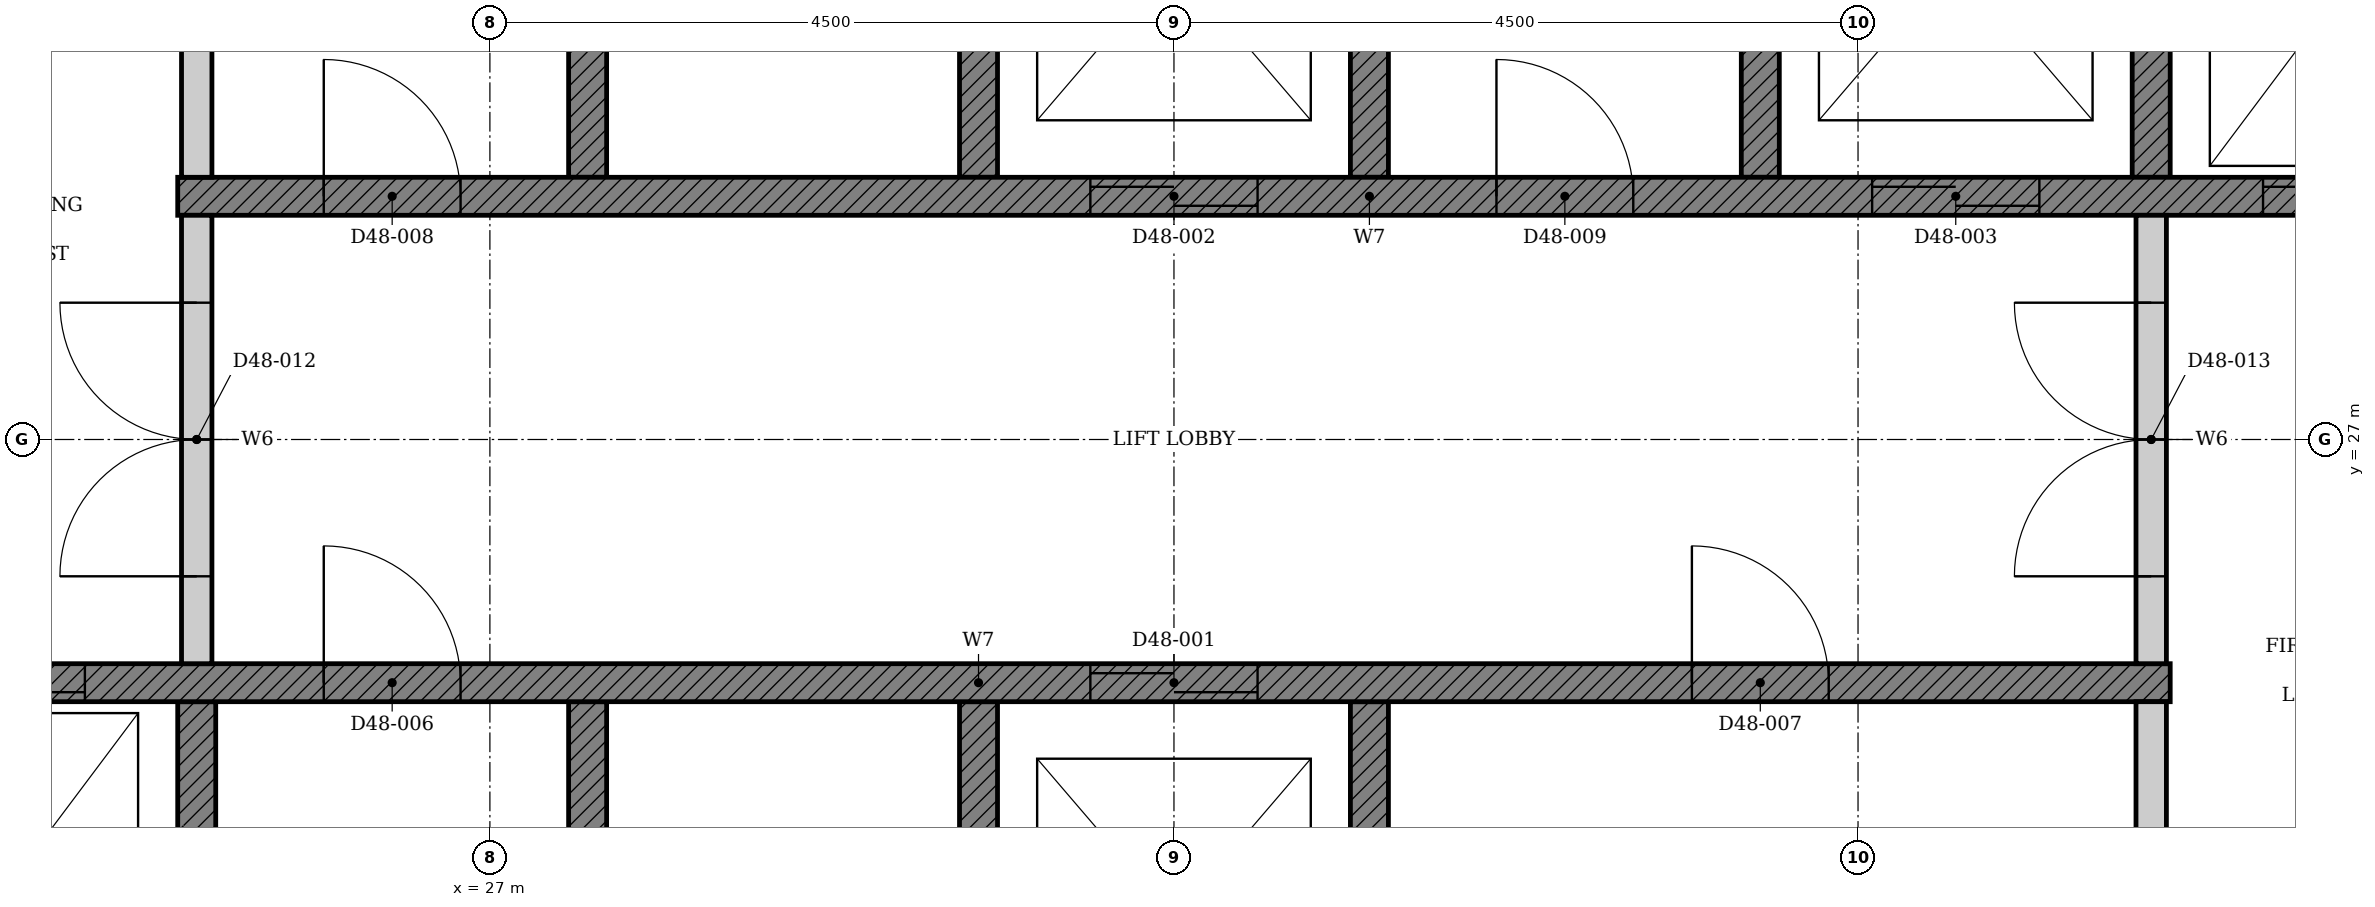
"""IFC4 building model, lengths in metres.
Left out: names, types, materials, properties, quantities, classifications, styles, units other than length and angle.
Written with IfcOpenShell. Run it as: python <this file> out.ifc"""

import sys

from ifc_helpers import new_model, si_unit, direction, frame, frame_2d, origin, place, context, subcontext, project, spatial, polyline, rectangle, outline, extrude, element, fill, save


model = new_model("IFC4")
c1 = context("Model", 3, precision=1e-05, world=origin(), true_north=direction((0.0, 1.0)))
c2 = subcontext(c1, "Body", "Model", "MODEL_VIEW")
j1 = project(units=[si_unit("LENGTHUNIT", "METRE"), si_unit("PLANEANGLEUNIT", "RADIAN")], contexts=[c1])
p1 = place(None, origin())
s1 = spatial("IfcSite", under=j1, at=p1, CompositionType="ELEMENT")
p2 = place(p1, origin())
s2 = spatial("IfcBuilding", under=s1, at=p2, CompositionType="ELEMENT")
p3 = place(p2, frame((0.0, 0.0, 192.4)))
s3 = spatial("IfcBuildingStorey", under=s2, at=p3, CompositionType="ELEMENT", Elevation=192.4)
p4 = place(p3, origin())
e1 = element("IfcWall", 1, at=p4, inside=s3, PredefinedType="SHEAR", context=c2, shape_type="SweptSolid", body=[
    extrude(outline(polyline([(22.375, 22.35), (25.197, 22.35), (25.197, 25.275), (24.947, 25.275), (24.947, 22.65), (22.625, 22.65), (22.625, 25.275), (22.375, 25.275), (22.375, 22.35)])), origin(), (0.0, 0.0, 1.0), 3.4),
])
p5 = place(p3, origin())
e2 = element("IfcWall", 2, at=p5, inside=s3, PredefinedType="SHEAR", context=c2, shape_type="SweptSolid", body=[
    extrude(outline(polyline([(27.518, 22.35), (32.911, 22.35), (32.911, 25.275), (32.661, 25.275), (32.661, 22.65), (30.339, 22.65), (30.339, 25.275), (30.089, 25.275), (30.089, 22.65), (27.768, 22.65), (27.768, 25.275), (27.518, 25.275), (27.518, 22.35)])), origin(), (0.0, 0.0, 1.0), 3.4),
])
p6 = place(p3, origin())
e3 = element("IfcWall", 3, at=p6, inside=s3, PredefinedType="SHEAR", context=c2, shape_type="SweptSolid", body=[
    extrude(outline(polyline([(27.518, 28.725), (27.768, 28.725), (27.768, 31.35), (30.089, 31.35), (30.089, 28.725), (30.339, 28.725), (30.339, 31.35), (32.661, 31.35), (32.661, 28.725), (32.911, 28.725), (32.911, 31.65), (27.518, 31.65), (27.518, 28.725)])), origin(), (0.0, 0.0, 1.0), 3.4),
])
p7 = place(p3, origin())
e4 = element("IfcWall", 4, at=p7, inside=s3, PredefinedType="SHEAR", context=c2, shape_type="SweptSolid", body=[
    extrude(outline(polyline([(35.232, 28.725), (35.482, 28.725), (35.482, 31.35), (37.803, 31.35), (37.803, 28.725), (38.053, 28.725), (38.053, 31.35), (40.375, 31.35), (40.375, 28.725), (40.625, 28.725), (40.625, 31.65), (35.232, 31.65), (35.232, 28.725)])), origin(), (0.0, 0.0, 1.0), 3.4),
])
p8 = place(p3, frame((22.375, 25.4, 0.0), z_axis=(0.0, 0.0, 1.0), x_axis=(1.0, 0.0, 0.0)))
e5 = element("IfcWall", 5, at=p8, inside=s3, PredefinedType="SHEAR", context=c2, shape_type="SweptSolid", body=[
    extrude(rectangle(XDim=15.678, YDim=0.25, at=frame_2d((7.839, 0.0))), origin(), (0.0, 0.0, 1.0), 3.4),
])
p9 = place(p8, frame((8.575, 0.0, 0.0)))
e6 = element("IfcOpeningElement", 6, at=p9, cuts=e5, PredefinedType="OPENING", context=c2, shape_type="SweptSolid", body=[
    extrude(rectangle(XDim=1.1, YDim=2.1, at=frame_2d((0.55, 1.05))), frame((0.0, 0.135, 0.0), z_axis=(0.0, -1.0, 0.0), x_axis=(1.0, 0.0, 0.0)), (0.0, 0.0, 1.0), 0.27),
])
p10 = place(p8, frame((0.861, 0.0, 0.0)))
e7 = element("IfcOpeningElement", 7, at=p10, cuts=e5, PredefinedType="OPENING", context=c2, shape_type="SweptSolid", body=[
    extrude(rectangle(XDim=1.1, YDim=2.1, at=frame_2d((0.55, 1.05))), frame((0.0, 0.135, 0.0), z_axis=(0.0, -1.0, 0.0), x_axis=(1.0, 0.0, 0.0)), (0.0, 0.0, 1.0), 0.27),
])
p11 = place(p8, frame((3.532, 0.0, 0.0)))
e8 = element("IfcOpeningElement", 8, at=p11, cuts=e5, PredefinedType="OPENING", context=c2, shape_type="SweptSolid", body=[
    extrude(rectangle(XDim=0.9, YDim=2.1, at=frame_2d((0.45, 1.05))), frame((0.0, 0.135, 0.0), z_axis=(0.0, -1.0, 0.0), x_axis=(1.0, 0.0, 0.0)), (0.0, 0.0, 1.0), 0.27),
])
p12 = place(p8, frame((12.532, 0.0, 0.0)))
e9 = element("IfcOpeningElement", 9, at=p12, cuts=e5, PredefinedType="OPENING", context=c2, shape_type="SweptSolid", body=[
    extrude(rectangle(XDim=0.9, YDim=2.1, at=frame_2d((0.45, 1.05))), frame((0.0, 0.135, 0.0), z_axis=(0.0, -1.0, 0.0), x_axis=(1.0, 0.0, 0.0)), (0.0, 0.0, 1.0), 0.27),
])
p13 = place(p3, frame((24.947, 28.6, 0.0), z_axis=(0.0, 0.0, 1.0), x_axis=(1.0, 0.0, 0.0)))
e10 = element("IfcWall", 10, at=p13, inside=s3, PredefinedType="SHEAR", context=c2, shape_type="SweptSolid", body=[
    extrude(rectangle(XDim=15.678, YDim=0.25, at=frame_2d((7.839, 0.0))), origin(), (0.0, 0.0, 1.0), 3.4),
])
p14 = place(p13, frame((6.004, 0.0, 0.0)))
e11 = element("IfcOpeningElement", 11, at=p14, cuts=e10, PredefinedType="OPENING", context=c2, shape_type="SweptSolid", body=[
    extrude(rectangle(XDim=1.1, YDim=2.1, at=frame_2d((0.55, 1.05))), frame((0.0, 0.135, 0.0), z_axis=(0.0, -1.0, 0.0), x_axis=(1.0, 0.0, 0.0)), (0.0, 0.0, 1.0), 0.27),
])
p15 = place(p13, frame((11.146, 0.0, 0.0)))
e12 = element("IfcOpeningElement", 12, at=p15, cuts=e10, PredefinedType="OPENING", context=c2, shape_type="SweptSolid", body=[
    extrude(rectangle(XDim=1.1, YDim=2.1, at=frame_2d((0.55, 1.05))), frame((0.0, 0.135, 0.0), z_axis=(0.0, -1.0, 0.0), x_axis=(1.0, 0.0, 0.0)), (0.0, 0.0, 1.0), 0.27),
])
p16 = place(p13, frame((13.718, 0.0, 0.0)))
e13 = element("IfcOpeningElement", 13, at=p16, cuts=e10, PredefinedType="OPENING", context=c2, shape_type="SweptSolid", body=[
    extrude(rectangle(XDim=1.1, YDim=2.1, at=frame_2d((0.55, 1.05))), frame((0.0, 0.135, 0.0), z_axis=(0.0, -1.0, 0.0), x_axis=(1.0, 0.0, 0.0)), (0.0, 0.0, 1.0), 0.27),
])
p17 = place(p13, frame((0.961, 0.0, 0.0)))
e14 = element("IfcOpeningElement", 14, at=p17, cuts=e10, PredefinedType="OPENING", context=c2, shape_type="SweptSolid", body=[
    extrude(rectangle(XDim=0.9, YDim=2.1, at=frame_2d((0.45, 1.05))), frame((0.0, 0.135, 0.0), z_axis=(0.0, -1.0, 0.0), x_axis=(1.0, 0.0, 0.0)), (0.0, 0.0, 1.0), 0.27),
])
p18 = place(p13, frame((8.675, 0.0, 0.0)))
e15 = element("IfcOpeningElement", 15, at=p18, cuts=e10, PredefinedType="OPENING", context=c2, shape_type="SweptSolid", body=[
    extrude(rectangle(XDim=0.9, YDim=2.1, at=frame_2d((0.45, 1.05))), frame((0.0, 0.135, 0.0), z_axis=(0.0, -1.0, 0.0), x_axis=(1.0, 0.0, 0.0)), (0.0, 0.0, 1.0), 0.27),
])
for number, where, z_axis, x_axis in (
    (16, (37.928, 22.65, 0.0), (0.0, 0.0, 1.0), (0.0, 1.0, 0.0)),
    (17, (25.072, 28.725, 0.0), (0.0, 0.0, 1.0), (0.0, 1.0, 0.0)),
):
    element("IfcWall", number, at=place(p3, frame(where, z_axis=z_axis, x_axis=x_axis)), inside=s3, PredefinedType="PARTITIONING", context=c2, shape_type="SweptSolid", body=[
        extrude(rectangle(XDim=2.625, YDim=0.2, at=frame_2d((1.312, 0.0))), origin(), (0.0, 0.0, 1.0), 3.4),
    ])
p19 = place(p3, frame((25.072, 25.525, 0.0), z_axis=(0.0, 0.0, 1.0), x_axis=(0.0, 1.0, 0.0)))
e18 = element("IfcWall", 18, at=p19, inside=s3, PredefinedType="PARTITIONING", context=c2, shape_type="SweptSolid", body=[
    extrude(rectangle(XDim=2.95, YDim=0.2, at=frame_2d((1.475, 0.0))), origin(), (0.0, 0.0, 1.0), 3.4),
])
p20 = place(p19, frame((0.575, 0.0, 0.0)))
e19 = element("IfcOpeningElement", 19, at=p20, cuts=e18, PredefinedType="OPENING", context=c2, shape_type="SweptSolid", body=[
    extrude(rectangle(XDim=1.8, YDim=2.1, at=frame_2d((0.9, 1.05))), frame((0.0, 0.11, 0.0), z_axis=(0.0, -1.0, 0.0), x_axis=(1.0, 0.0, 0.0)), (0.0, 0.0, 1.0), 0.22),
])
p21 = place(p3, frame((37.928, 25.525, 0.0), z_axis=(0.0, 0.0, 1.0), x_axis=(0.0, 1.0, 0.0)))
e20 = element("IfcWall", 20, at=p21, inside=s3, PredefinedType="PARTITIONING", context=c2, shape_type="SweptSolid", body=[
    extrude(rectangle(XDim=2.95, YDim=0.2, at=frame_2d((1.475, 0.0))), origin(), (0.0, 0.0, 1.0), 3.4),
])
p22 = place(p21, frame((0.575, 0.0, 0.0)))
e21 = element("IfcOpeningElement", 21, at=p22, cuts=e20, PredefinedType="OPENING", context=c2, shape_type="SweptSolid", body=[
    extrude(rectangle(XDim=1.8, YDim=2.1, at=frame_2d((0.9, 1.05))), frame((0.0, 0.11, 0.0), z_axis=(0.0, -1.0, 0.0), x_axis=(1.0, 0.0, 0.0)), (0.0, 0.0, 1.0), 0.22),
])
p23 = place(p9, origin())
e22 = element("IfcDoor", 22, at=p23, inside=s3, OperationType="DOUBLE_DOOR_SLIDING", PredefinedType="DOOR", context=c2, shape_type="SweptSolid", body=[
    extrude(rectangle(XDim=1.1, YDim=2.1, at=frame_2d((0.55, 1.05))), frame((0.0, 0.025, 0.0), z_axis=(0.0, -1.0, 0.0), x_axis=(1.0, 0.0, 0.0)), (0.0, 0.0, 1.0), 0.05),
])
fill(e6, e22)
p24 = place(p14, origin())
e23 = element("IfcDoor", 23, at=p24, inside=s3, OperationType="DOUBLE_DOOR_SLIDING", PredefinedType="DOOR", context=c2, shape_type="SweptSolid", body=[
    extrude(rectangle(XDim=1.1, YDim=2.1, at=frame_2d((0.55, 1.05))), frame((0.0, 0.025, 0.0), z_axis=(0.0, -1.0, 0.0), x_axis=(1.0, 0.0, 0.0)), (0.0, 0.0, 1.0), 0.05),
])
fill(e11, e23)
p25 = place(p15, origin())
e24 = element("IfcDoor", 24, at=p25, inside=s3, OperationType="DOUBLE_DOOR_SLIDING", PredefinedType="DOOR", context=c2, shape_type="SweptSolid", body=[
    extrude(rectangle(XDim=1.1, YDim=2.1, at=frame_2d((0.55, 1.05))), frame((0.0, 0.025, 0.0), z_axis=(0.0, -1.0, 0.0), x_axis=(1.0, 0.0, 0.0)), (0.0, 0.0, 1.0), 0.05),
])
fill(e12, e24)
p26 = place(p10, origin())
e25 = element("IfcDoor", 25, at=p26, inside=s3, OperationType="DOUBLE_DOOR_SLIDING", PredefinedType="DOOR", context=c2, shape_type="SweptSolid", body=[
    extrude(rectangle(XDim=1.1, YDim=2.1, at=frame_2d((0.55, 1.05))), frame((0.0, 0.025, 0.0), z_axis=(0.0, -1.0, 0.0), x_axis=(1.0, 0.0, 0.0)), (0.0, 0.0, 1.0), 0.05),
])
fill(e7, e25)
p27 = place(p16, origin())
e26 = element("IfcDoor", 26, at=p27, inside=s3, OperationType="DOUBLE_DOOR_SLIDING", PredefinedType="DOOR", context=c2, shape_type="SweptSolid", body=[
    extrude(rectangle(XDim=1.1, YDim=2.1, at=frame_2d((0.55, 1.05))), frame((0.0, 0.025, 0.0), z_axis=(0.0, -1.0, 0.0), x_axis=(1.0, 0.0, 0.0)), (0.0, 0.0, 1.0), 0.05),
])
fill(e13, e26)
p28 = place(p11, origin())
e27 = element("IfcDoor", 27, at=p28, inside=s3, OperationType="SINGLE_SWING_LEFT", PredefinedType="DOOR", context=c2, shape_type="SweptSolid", body=[
    extrude(rectangle(XDim=0.9, YDim=2.1, at=frame_2d((0.45, 1.05))), frame((0.0, 0.025, 0.0), z_axis=(0.0, -1.0, 0.0), x_axis=(1.0, 0.0, 0.0)), (0.0, 0.0, 1.0), 0.05),
])
fill(e8, e27)
p29 = place(p12, origin())
e28 = element("IfcDoor", 28, at=p29, inside=s3, OperationType="SINGLE_SWING_LEFT", PredefinedType="DOOR", context=c2, shape_type="SweptSolid", body=[
    extrude(rectangle(XDim=0.9, YDim=2.1, at=frame_2d((0.45, 1.05))), frame((0.0, 0.025, 0.0), z_axis=(0.0, -1.0, 0.0), x_axis=(1.0, 0.0, 0.0)), (0.0, 0.0, 1.0), 0.05),
])
fill(e9, e28)
p30 = place(p17, origin())
e29 = element("IfcDoor", 29, at=p30, inside=s3, OperationType="SINGLE_SWING_LEFT", PredefinedType="DOOR", context=c2, shape_type="SweptSolid", body=[
    extrude(rectangle(XDim=0.9, YDim=2.1, at=frame_2d((0.45, 1.05))), frame((0.0, 0.025, 0.0), z_axis=(0.0, -1.0, 0.0), x_axis=(1.0, 0.0, 0.0)), (0.0, 0.0, 1.0), 0.05),
])
fill(e14, e29)
p31 = place(p18, origin())
e30 = element("IfcDoor", 30, at=p31, inside=s3, OperationType="SINGLE_SWING_LEFT", PredefinedType="DOOR", context=c2, shape_type="SweptSolid", body=[
    extrude(rectangle(XDim=0.9, YDim=2.1, at=frame_2d((0.45, 1.05))), frame((0.0, 0.025, 0.0), z_axis=(0.0, -1.0, 0.0), x_axis=(1.0, 0.0, 0.0)), (0.0, 0.0, 1.0), 0.05),
])
fill(e15, e30)
p32 = place(p20, origin())
e31 = element("IfcDoor", 31, at=p32, inside=s3, OperationType="DOUBLE_DOOR_SINGLE_SWING", PredefinedType="DOOR", context=c2, shape_type="SweptSolid", body=[
    extrude(rectangle(XDim=1.8, YDim=2.1, at=frame_2d((0.9, 1.05))), frame((0.0, 0.025, 0.0), z_axis=(0.0, -1.0, 0.0), x_axis=(1.0, 0.0, 0.0)), (0.0, 0.0, 1.0), 0.05),
])
fill(e19, e31)
p33 = place(p22, origin())
e32 = element("IfcDoor", 32, at=p33, inside=s3, OperationType="DOUBLE_DOOR_SINGLE_SWING", PredefinedType="DOOR", context=c2, shape_type="SweptSolid", body=[
    extrude(rectangle(XDim=1.8, YDim=2.1, at=frame_2d((0.9, 1.05))), frame((0.0, 0.025, 0.0), z_axis=(0.0, -1.0, 0.0), x_axis=(1.0, 0.0, 0.0)), (0.0, 0.0, 1.0), 0.05),
])
fill(e21, e32)
save(model, sys.argv[1])
